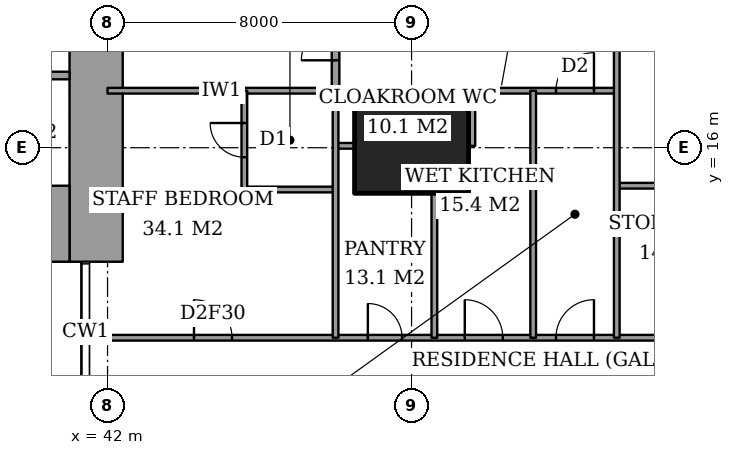
"""IFC4 building model, lengths in metres.
Left out: names, types, materials, properties, quantities, classifications, styles, units other than length and angle.
Written with IfcOpenShell. Run it as: python <this file> out.ifc"""

import sys

from ifc_helpers import new_model, si_unit, direction, frame, frame_2d, origin, origin_2d, place, context, subcontext, project, spatial, rectangle, extrude, element, fill, save


model = new_model("IFC4")
c1 = context("Model", 3, precision=1e-05, world=origin(), true_north=direction((0.0, 1.0)))
c2 = subcontext(c1, "Body", "Model", "MODEL_VIEW")
j1 = project(units=[si_unit("LENGTHUNIT", "METRE"), si_unit("PLANEANGLEUNIT", "RADIAN")], contexts=[c1])
p1 = place(None, origin())
s1 = spatial("IfcSite", under=j1, at=p1, CompositionType="ELEMENT")
p2 = place(p1, origin())
s2 = spatial("IfcBuilding", under=s1, at=p2, CompositionType="ELEMENT")
p3 = place(p2, frame((0.0, 0.0, 237.6)))
s3 = spatial("IfcBuildingStorey", under=s2, at=p3, CompositionType="ELEMENT", Elevation=237.6)
p4 = place(p3, frame((50.0, 16.0, 0.0), z_axis=(0.0, 0.0, 1.0), x_axis=(1.0, 0.0, 0.0)))
e1 = element("IfcColumn", 1, at=p4, inside=s3, PredefinedType="COLUMN", context=c2, shape_type="SweptSolid", body=[
    extrude(rectangle(XDim=3.0, YDim=2.4, at=origin_2d()), origin(), (0.0, 0.0, 1.0), 3.6),
])
p5 = place(p3, frame((37.85, 14.0, 0.0), z_axis=(0.0, 0.0, 1.0), x_axis=(1.0, 0.0, 0.0)))
e2 = element("IfcWall", 2, at=p5, inside=s3, PredefinedType="SHEAR", context=c2, shape_type="SweptSolid", body=[
    extrude(rectangle(XDim=3.15, YDim=2.0, at=frame_2d((1.575, 0.0))), origin(), (0.0, 0.0, 1.0), 3.6),
])
p6 = place(p3, frame((41.7, 13.0, 0.0), z_axis=(0.0, 0.0, 1.0), x_axis=(0.0, 1.0, 0.0)))
e3 = element("IfcWall", 3, at=p6, inside=s3, PredefinedType="SHEAR", context=c2, shape_type="SweptSolid", body=[
    extrude(rectangle(XDim=11.85, YDim=1.4, at=frame_2d((5.925, 0.0))), origin(), (0.0, 0.0, 1.0), 3.6),
])
p7 = place(p6, frame((7.5, 0.0, 0.0)))
e4 = element("IfcOpeningElement", 4, at=p7, cuts=e3, PredefinedType="OPENING", context=c2, shape_type="SweptSolid", body=[
    extrude(rectangle(XDim=1.8, YDim=2.4, at=frame_2d((0.9, 1.2))), frame((0.0, 0.71, 0.0), z_axis=(0.0, -1.0, 0.0), x_axis=(1.0, 0.0, 0.0)), (0.0, 0.0, 1.0), 1.42),
])
p8 = place(p3, frame((41.439, 11.0, 0.0), z_axis=(0.0, 0.0, 1.0), x_axis=(1.0, 0.0, 0.0)))
e5 = element("IfcWall", 5, at=p8, inside=s3, PredefinedType="PARTITIONING", context=c2, shape_type="SweptSolid", body=[
    extrude(rectangle(XDim=25.011, YDim=0.15, at=frame_2d((12.505, 0.0))), origin(), (0.0, 0.0, 1.0), 3.35),
])
p9 = place(p8, frame((12.361, 0.0, 0.0)))
e6 = element("IfcOpeningElement", 6, at=p9, cuts=e5, PredefinedType="OPENING", context=c2, shape_type="SweptSolid", body=[
    extrude(rectangle(XDim=1.0, YDim=2.1, at=frame_2d((0.5, 1.05))), frame((0.0, 0.085, 0.0), z_axis=(0.0, -1.0, 0.0), x_axis=(1.0, 0.0, 0.0)), (0.0, 0.0, 1.0), 0.17),
])
p10 = place(p8, frame((20.924, 0.0, 0.0)))
e7 = element("IfcOpeningElement", 7, at=p10, cuts=e5, PredefinedType="OPENING", context=c2, shape_type="SweptSolid", body=[
    extrude(rectangle(XDim=1.0, YDim=2.1, at=frame_2d((0.5, 1.05))), frame((0.0, 0.085, 0.0), z_axis=(0.0, -1.0, 0.0), x_axis=(1.0, 0.0, 0.0)), (0.0, 0.0, 1.0), 0.17),
])
p11 = place(p8, frame((15.448, 0.0, 0.0)))
e8 = element("IfcOpeningElement", 8, at=p11, cuts=e5, PredefinedType="OPENING", context=c2, shape_type="SweptSolid", body=[
    extrude(rectangle(XDim=0.9, YDim=2.1, at=frame_2d((0.45, 1.05))), frame((0.0, 0.085, 0.0), z_axis=(0.0, -1.0, 0.0), x_axis=(1.0, 0.0, 0.0)), (0.0, 0.0, 1.0), 0.17),
])
p12 = place(p8, frame((9.961, 0.0, 0.0)))
e9 = element("IfcOpeningElement", 9, at=p12, cuts=e5, PredefinedType="OPENING", context=c2, shape_type="SweptSolid", body=[
    extrude(rectangle(XDim=1.0, YDim=2.1, at=frame_2d((0.5, 1.05))), frame((0.0, 0.085, 0.0), z_axis=(0.0, -1.0, 0.0), x_axis=(1.0, 0.0, 0.0)), (0.0, 0.0, 1.0), 0.17),
])
p13 = place(p8, frame((7.411, 0.0, 0.0)))
e10 = element("IfcOpeningElement", 10, at=p13, cuts=e5, PredefinedType="OPENING", context=c2, shape_type="SweptSolid", body=[
    extrude(rectangle(XDim=0.9, YDim=2.1, at=frame_2d((0.45, 1.05))), frame((0.0, 0.085, 0.0), z_axis=(0.0, -1.0, 0.0), x_axis=(1.0, 0.0, 0.0)), (0.0, 0.0, 1.0), 0.17),
])
p14 = place(p8, frame((2.836, 0.0, 0.0)))
e11 = element("IfcOpeningElement", 11, at=p14, cuts=e5, PredefinedType="OPENING", context=c2, shape_type="SweptSolid", body=[
    extrude(rectangle(XDim=1.0, YDim=2.1, at=frame_2d((0.5, 1.05))), frame((0.0, 0.085, 0.0), z_axis=(0.0, -1.0, 0.0), x_axis=(1.0, 0.0, 0.0)), (0.0, 0.0, 1.0), 0.17),
])
p15 = place(p3, frame((45.6, 14.9, 0.0), z_axis=(0.0, 0.0, 1.0), x_axis=(1.0, 0.0, 0.0)))
e12 = element("IfcWall", 12, at=p15, inside=s3, PredefinedType="PARTITIONING", context=c2, shape_type="SweptSolid", body=[
    extrude(rectangle(XDim=2.4, YDim=0.15, at=frame_2d((1.2, 0.0))), origin(), (0.0, 0.0, 1.0), 3.35),
])
p16 = place(p3, frame((55.4, 15.0, 0.0), z_axis=(0.0, 0.0, 1.0), x_axis=(1.0, 0.0, 0.0)))
e13 = element("IfcWall", 13, at=p16, inside=s3, PredefinedType="PARTITIONING", context=c2, shape_type="SweptSolid", body=[
    extrude(rectangle(XDim=1.1, YDim=0.15, at=frame_2d((0.55, 0.0))), origin(), (0.0, 0.0, 1.0), 3.35),
])
p17 = place(p3, frame((48.0, 16.05, 0.0), z_axis=(0.0, 0.0, 1.0), x_axis=(1.0, 0.0, 0.0)))
e14 = element("IfcWall", 14, at=p17, inside=s3, PredefinedType="PARTITIONING", context=c2, shape_type="SweptSolid", body=[
    extrude(rectangle(XDim=0.5, YDim=0.15, at=frame_2d((0.25, 0.0))), origin(), (0.0, 0.0, 1.0), 2.634),
])
p18 = place(p3, frame((42.0, 17.5, 0.0), z_axis=(0.0, 0.0, 1.0), x_axis=(1.0, 0.0, 0.0)))
e15 = element("IfcWall", 15, at=p18, inside=s3, PredefinedType="PARTITIONING", context=c2, shape_type="SweptSolid", body=[
    extrude(rectangle(XDim=6.0, YDim=0.15, at=frame_2d((3.0, 0.0))), origin(), (0.0, 0.0, 1.0), 3.35),
])
p19 = place(p3, frame((51.6, 17.5, 0.0), z_axis=(0.0, 0.0, 1.0), x_axis=(1.0, 0.0, 0.0)))
e16 = element("IfcWall", 16, at=p19, inside=s3, PredefinedType="PARTITIONING", context=c2, shape_type="SweptSolid", body=[
    extrude(rectangle(XDim=3.8, YDim=0.15, at=frame_2d((1.9, 0.0))), origin(), (0.0, 0.0, 1.0), 3.35),
])
p20 = place(p19, frame((2.2, 0.0, 0.0)))
e17 = element("IfcOpeningElement", 17, at=p20, cuts=e16, PredefinedType="OPENING", context=c2, shape_type="SweptSolid", body=[
    extrude(rectangle(XDim=1.0, YDim=2.1, at=frame_2d((0.5, 1.05))), frame((0.0, 0.085, 0.0), z_axis=(0.0, -1.0, 0.0), x_axis=(1.0, 0.0, 0.0)), (0.0, 0.0, 1.0), 0.17),
])
p21 = place(p3, frame((45.6, 14.9, 0.0), z_axis=(0.0, 0.0, 1.0), x_axis=(0.0, 1.0, 0.0)))
e18 = element("IfcWall", 18, at=p21, inside=s3, PredefinedType="PARTITIONING", context=c2, shape_type="SweptSolid", body=[
    extrude(rectangle(XDim=2.6, YDim=0.15, at=frame_2d((1.3, 0.0))), origin(), (0.0, 0.0, 1.0), 3.35),
])
p22 = place(p21, frame((0.85, 0.0, 0.0)))
e19 = element("IfcOpeningElement", 19, at=p22, cuts=e18, PredefinedType="OPENING", context=c2, shape_type="SweptSolid", body=[
    extrude(rectangle(XDim=0.9, YDim=2.1, at=frame_2d((0.45, 1.05))), frame((0.0, 0.085, 0.0), z_axis=(0.0, -1.0, 0.0), x_axis=(1.0, 0.0, 0.0)), (0.0, 0.0, 1.0), 0.17),
])
p23 = place(p3, frame((48.0, 17.5, 0.0), z_axis=(0.0, 0.0, 1.0), x_axis=(0.0, 1.0, 0.0)))
e20 = element("IfcWall", 20, at=p23, inside=s3, PredefinedType="PARTITIONING", context=c2, shape_type="SweptSolid", body=[
    extrude(rectangle(XDim=6.5, YDim=0.2, at=frame_2d((3.25, 0.0))), origin(), (0.0, 0.0, 1.0), 3.35),
])
p24 = place(p23, frame((3.9, 0.0, 0.0)))
e21 = element("IfcOpeningElement", 21, at=p24, cuts=e20, PredefinedType="OPENING", context=c2, shape_type="SweptSolid", body=[
    extrude(rectangle(XDim=1.2, YDim=2.4, at=frame_2d((0.6, 1.2))), frame((0.0, 0.11, 0.0), z_axis=(0.0, -1.0, 0.0), x_axis=(1.0, 0.0, 0.0)), (0.0, 0.0, 1.0), 0.22),
])
p25 = place(p23, frame((0.8, 0.0, 0.0)))
e22 = element("IfcOpeningElement", 22, at=p25, cuts=e20, PredefinedType="OPENING", context=c2, shape_type="SweptSolid", body=[
    extrude(rectangle(XDim=0.9, YDim=2.1, at=frame_2d((0.45, 1.05))), frame((0.0, 0.11, 0.0), z_axis=(0.0, -1.0, 0.0), x_axis=(1.0, 0.0, 0.0)), (0.0, 0.0, 1.0), 0.22),
])
p26 = place(p3, frame((48.0, 11.0, 0.0), z_axis=(0.0, 0.0, 1.0), x_axis=(0.0, 1.0, 0.0)))
e23 = element("IfcWall", 23, at=p26, inside=s3, PredefinedType="PARTITIONING", context=c2, shape_type="SweptSolid", body=[
    extrude(rectangle(XDim=6.5, YDim=0.15, at=frame_2d((3.25, 0.0))), origin(), (0.0, 0.0, 1.0), 3.35),
])
p27 = place(p3, frame((50.6, 11.0, 0.0), z_axis=(0.0, 0.0, 1.0), x_axis=(0.0, 1.0, 0.0)))
e24 = element("IfcWall", 24, at=p27, inside=s3, PredefinedType="PARTITIONING", context=c2, shape_type="SweptSolid", body=[
    extrude(rectangle(XDim=3.8, YDim=0.15, at=frame_2d((1.9, 0.0))), origin(), (0.0, 0.0, 1.0), 3.35),
])
p28 = place(p3, frame((51.6, 16.05, 0.0), z_axis=(0.0, 0.0, 1.0), x_axis=(0.0, 1.0, 0.0)))
e25 = element("IfcWall", 25, at=p28, inside=s3, PredefinedType="PARTITIONING", context=c2, shape_type="SweptSolid", body=[
    extrude(rectangle(XDim=1.45, YDim=0.15, at=frame_2d((0.725, 0.0))), origin(), (0.0, 0.0, 1.0), 3.35),
])
p29 = place(p3, frame((53.2, 11.0, 0.0), z_axis=(0.0, 0.0, 1.0), x_axis=(0.0, 1.0, 0.0)))
e26 = element("IfcWall", 26, at=p29, inside=s3, PredefinedType="PARTITIONING", context=c2, shape_type="SweptSolid", body=[
    extrude(rectangle(XDim=6.5, YDim=0.15, at=frame_2d((3.25, 0.0))), origin(), (0.0, 0.0, 1.0), 3.35),
])
p30 = place(p3, frame((55.4, 11.0, 0.0), z_axis=(0.0, 0.0, 1.0), x_axis=(0.0, 1.0, 0.0)))
e27 = element("IfcWall", 27, at=p30, inside=s3, PredefinedType="PARTITIONING", context=c2, shape_type="SweptSolid", body=[
    extrude(rectangle(XDim=10.6, YDim=0.15, at=frame_2d((5.3, 0.0))), origin(), (0.0, 0.0, 1.0), 3.35),
])
p31 = place(p30, frame((8.05, 0.0, 0.0)))
e28 = element("IfcOpeningElement", 28, at=p31, cuts=e27, PredefinedType="OPENING", context=c2, shape_type="SweptSolid", body=[
    extrude(rectangle(XDim=1.0, YDim=2.1, at=frame_2d((0.5, 1.05))), frame((0.0, 0.085, 0.0), z_axis=(0.0, -1.0, 0.0), x_axis=(1.0, 0.0, 0.0)), (0.0, 0.0, 1.0), 0.17),
])
p32 = place(p3, frame((28.3, 17.9, 0.0), z_axis=(0.0, 0.0, 1.0), x_axis=(1.0, 0.0, 0.0)))
e29 = element("IfcWall", 29, at=p32, inside=s3, PredefinedType="PARTITIONING", context=c2, shape_type="SweptSolid", body=[
    extrude(rectangle(XDim=12.7, YDim=0.2, at=frame_2d((6.35, 0.0))), origin(), (0.0, 0.0, 1.0), 3.6),
])
p33 = place(p32, frame((1.05, 0.0, 0.0)))
e30 = element("IfcOpeningElement", 30, at=p33, cuts=e29, PredefinedType="OPENING", context=c2, shape_type="SweptSolid", body=[
    extrude(rectangle(XDim=0.9, YDim=2.1, at=frame_2d((0.45, 1.05))), frame((0.0, 0.11, 0.0), z_axis=(0.0, -1.0, 0.0), x_axis=(1.0, 0.0, 0.0)), (0.0, 0.0, 1.0), 0.22),
])
p34 = place(p32, frame((4.25, 0.0, 0.0)))
e31 = element("IfcOpeningElement", 31, at=p34, cuts=e29, PredefinedType="OPENING", context=c2, shape_type="SweptSolid", body=[
    extrude(rectangle(XDim=0.9, YDim=2.1, at=frame_2d((0.45, 1.05))), frame((0.0, 0.11, 0.0), z_axis=(0.0, -1.0, 0.0), x_axis=(1.0, 0.0, 0.0)), (0.0, 0.0, 1.0), 0.22),
])
p35 = place(p32, frame((10.6, 0.0, 0.0)))
e32 = element("IfcOpeningElement", 32, at=p35, cuts=e29, PredefinedType="OPENING", context=c2, shape_type="SweptSolid", body=[
    extrude(rectangle(XDim=1.2, YDim=2.1, at=frame_2d((0.6, 1.05))), frame((0.0, 0.11, 0.0), z_axis=(0.0, -1.0, 0.0), x_axis=(1.0, 0.0, 0.0)), (0.0, 0.0, 1.0), 0.22),
])
p36 = place(p9, origin())
e33 = element("IfcDoor", 33, at=p36, inside=s3, OperationType="SINGLE_SWING_LEFT", PredefinedType="DOOR", context=c2, shape_type="SweptSolid", body=[
    extrude(rectangle(XDim=1.0, YDim=2.1, at=frame_2d((0.5, 1.05))), frame((0.0, 0.025, 0.0), z_axis=(0.0, -1.0, 0.0), x_axis=(1.0, 0.0, 0.0)), (0.0, 0.0, 1.0), 0.05),
])
fill(e6, e33)
p37 = place(p20, origin())
e34 = element("IfcDoor", 34, at=p37, inside=s3, OperationType="SINGLE_SWING_LEFT", PredefinedType="DOOR", context=c2, shape_type="SweptSolid", body=[
    extrude(rectangle(XDim=1.0, YDim=2.1, at=frame_2d((0.5, 1.05))), frame((0.0, 0.025, 0.0), z_axis=(0.0, -1.0, 0.0), x_axis=(1.0, 0.0, 0.0)), (0.0, 0.0, 1.0), 0.05),
])
fill(e17, e34)
p38 = place(p12, origin())
e35 = element("IfcDoor", 35, at=p38, inside=s3, OperationType="SINGLE_SWING_RIGHT", PredefinedType="DOOR", context=c2, shape_type="SweptSolid", body=[
    extrude(rectangle(XDim=1.0, YDim=2.1, at=frame_2d((0.5, 1.05))), frame((0.0, 0.025, 0.0), z_axis=(0.0, -1.0, 0.0), x_axis=(1.0, 0.0, 0.0)), (0.0, 0.0, 1.0), 0.05),
])
fill(e9, e35)
p39 = place(p13, origin())
e36 = element("IfcDoor", 36, at=p39, inside=s3, OperationType="SINGLE_SWING_RIGHT", PredefinedType="DOOR", context=c2, shape_type="SweptSolid", body=[
    extrude(rectangle(XDim=0.9, YDim=2.1, at=frame_2d((0.45, 1.05))), frame((0.0, 0.025, 0.0), z_axis=(0.0, -1.0, 0.0), x_axis=(1.0, 0.0, 0.0)), (0.0, 0.0, 1.0), 0.05),
])
fill(e10, e36)
p40 = place(p22, origin())
e37 = element("IfcDoor", 37, at=p40, inside=s3, OperationType="SINGLE_SWING_LEFT", PredefinedType="DOOR", context=c2, shape_type="SweptSolid", body=[
    extrude(rectangle(XDim=0.9, YDim=2.1, at=frame_2d((0.45, 1.05))), frame((0.0, 0.025, 0.0), z_axis=(0.0, -1.0, 0.0), x_axis=(1.0, 0.0, 0.0)), (0.0, 0.0, 1.0), 0.05),
])
fill(e19, e37)
p41 = place(p14, origin())
e38 = element("IfcDoor", 38, at=p41, inside=s3, OperationType="SINGLE_SWING_RIGHT", PredefinedType="DOOR", context=c2, shape_type="SweptSolid", body=[
    extrude(rectangle(XDim=1.0, YDim=2.1, at=frame_2d((0.5, 1.05))), frame((0.0, 0.025, 0.0), z_axis=(0.0, -1.0, 0.0), x_axis=(1.0, 0.0, 0.0)), (0.0, 0.0, 1.0), 0.05),
])
fill(e11, e38)
p42 = place(p25, origin())
e39 = element("IfcDoor", 39, at=p42, inside=s3, OperationType="SINGLE_SWING_RIGHT", PredefinedType="DOOR", context=c2, shape_type="SweptSolid", body=[
    extrude(rectangle(XDim=0.9, YDim=2.1, at=frame_2d((0.45, 1.05))), frame((0.0, 0.025, 0.0), z_axis=(0.0, -1.0, 0.0), x_axis=(1.0, 0.0, 0.0)), (0.0, 0.0, 1.0), 0.05),
])
fill(e22, e39)
save(model, sys.argv[1])
